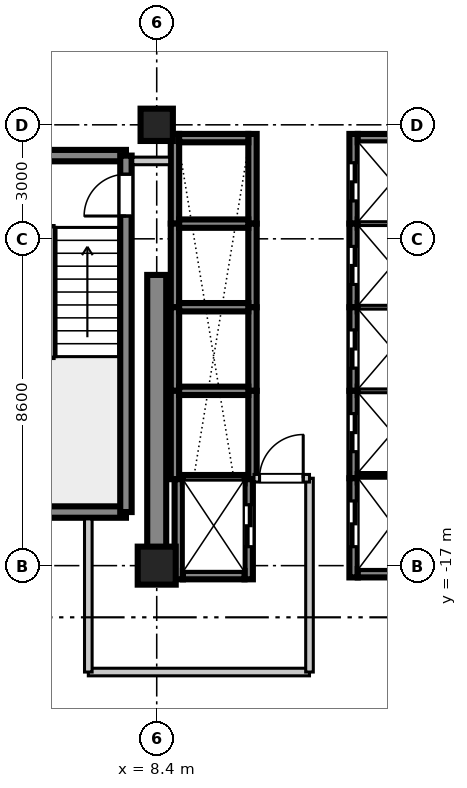
"""IFC4 building model, lengths in metres.
Left out: names, types, materials, properties, quantities, classifications, styles, units other than length and angle.
Written with IfcOpenShell. Run it as: python <this file> out.ifc"""

import sys

from ifc_helpers import new_model, si_unit, direction, frame, frame_2d, origin, origin_2d, place, context, subcontext, project, spatial, rectangle, extrude, source, transform, mapped, element, fill, save


model = new_model("IFC4")
c1 = context("Model", 3, precision=1e-05, world=origin(), true_north=direction((0.0, 1.0)))
c2 = subcontext(c1, "Body", "Model", "MODEL_VIEW")
j1 = project(units=[si_unit("LENGTHUNIT", "METRE"), si_unit("PLANEANGLEUNIT", "RADIAN")], contexts=[c1])
p1 = place(None, origin())
s1 = spatial("IfcSite", under=j1, at=p1, CompositionType="ELEMENT")
p2 = place(p1, origin())
s2 = spatial("IfcBuilding", under=s1, at=p2, CompositionType="ELEMENT")
p3 = place(p2, frame((0.0, 0.0, 241.9)))
s3 = spatial("IfcBuildingStorey", under=s2, at=p3, CompositionType="ELEMENT", Elevation=241.9)
m1 = source(origin(), c2, "Body", "SweptSolid", [
    extrude(rectangle(XDim=1.0, YDim=1.0, at=origin_2d()), origin(), (0.0, 0.0, 1.0), 3.655),
])
p4 = place(p3, frame((8.4, -17.0, 0.0), z_axis=(0.0, 0.0, 1.0), x_axis=(1.0, 0.0, 0.0)))
e1 = element("IfcColumn", 1, at=p4, inside=s3, PredefinedType="COLUMN", context=c2, shape_type="MappedRepresentation", body=[
    mapped(m1, transform((0.0, 0.0, 0.0), scale=1.0)),
])
m2 = source(origin(), c2, "Body", "SweptSolid", [
    extrude(rectangle(XDim=0.85, YDim=0.85, at=origin_2d()), origin(), (0.0, 0.0, 1.0), 3.655),
])
p5 = place(p3, frame((8.4, -5.4, 0.0), z_axis=(0.0, 0.0, 1.0), x_axis=(1.0, 0.0, 0.0)))
e2 = element("IfcColumn", 2, at=p5, inside=s3, PredefinedType="PILASTER", context=c2, shape_type="MappedRepresentation", body=[
    mapped(m2, transform((0.0, 0.0, 0.0), scale=1.0)),
])
m3 = source(origin(), c2, "Body", "SweptSolid", [
    extrude(rectangle(XDim=7.65, YDim=0.5, at=frame_2d((3.825, 0.0))), origin(), (0.0, 0.0, 1.0), 3.41),
])
p6 = place(p3, frame((8.4, -17.0, 0.0), z_axis=(0.0, 0.0, 1.0), x_axis=(0.0, 1.0, 0.0)))
e3 = element("IfcWall", 3, at=p6, inside=s3, PredefinedType="SHEAR", context=c2, shape_type="MappedRepresentation", body=[
    mapped(m3, transform((0.0, 0.0, 0.0), scale=1.0)),
])
m4 = source(origin(), c2, "Body", "SweptSolid", [
    extrude(rectangle(XDim=3.98, YDim=0.3, at=frame_2d((1.99, 0.0))), origin(), (0.0, 0.0, 1.0), 3.41),
])
for number, where, z_axis, x_axis in (
    (4, (3.61, -15.59, 0.0), (0.0, 0.0, 1.0), (1.0, 0.0, 0.0)),
    (5, (3.61, -6.21, 0.0), (0.0, 0.0, 1.0), (1.0, 0.0, 0.0)),
):
    element("IfcWall", number, at=place(p3, frame(where, z_axis=z_axis, x_axis=x_axis)), inside=s3, PredefinedType="SHEAR", context=c2, shape_type="MappedRepresentation", body=[
        mapped(m4, transform((0.0, 0.0, 0.0), scale=1.0)),
    ])
m5 = source(origin(), c2, "Body", "SweptSolid", [
    extrude(rectangle(XDim=9.38, YDim=0.3, at=frame_2d((4.69, 0.0))), origin(), (0.0, 0.0, 1.0), 3.41),
])
p7 = place(p3, frame((7.59, -15.59, 0.0), z_axis=(0.0, 0.0, 1.0), x_axis=(0.0, 1.0, 0.0)))
e6 = element("IfcWall", 6, at=p7, inside=s3, PredefinedType="SHEAR", context=c2, shape_type="MappedRepresentation", body=[
    mapped(m5, transform((0.0, 0.0, 0.0), scale=1.0)),
])
p8 = place(p7, frame((7.79, 0.0, 0.0)))
e7 = element("IfcOpeningElement", 7, at=p8, cuts=e6, PredefinedType="OPENING", context=c2, shape_type="SweptSolid", body=[
    extrude(rectangle(XDim=1.1, YDim=2.15, at=frame_2d((0.55, 1.075))), frame((0.0, 0.16, 0.0), z_axis=(0.0, -1.0, 0.0), x_axis=(1.0, 0.0, 0.0)), (0.0, 0.0, 1.0), 0.32),
])
m6 = source(origin(), c2, "Body", "SweptSolid", [
    extrude(rectangle(XDim=2.36, YDim=0.22, at=frame_2d((1.18, 0.0))), origin(), (0.0, 0.0, 1.0), 3.41),
])
p9 = place(p3, frame((13.58, -8.0, 0.0), z_axis=(0.0, 0.0, 1.0), x_axis=(0.0, 1.0, 0.0)))
e8 = element("IfcWall", 8, at=p9, inside=s3, PredefinedType="SHEAR", context=c2, shape_type="MappedRepresentation", body=[
    mapped(m6, transform((0.0, 0.0, 0.0), scale=1.0)),
])
p10 = place(p9, frame((0.6, 0.0, 0.0)))
e9 = element("IfcOpeningElement", 9, at=p10, cuts=e8, PredefinedType="OPENING", context=c2, shape_type="SweptSolid", body=[
    extrude(rectangle(XDim=1.0, YDim=2.2, at=frame_2d((0.5, 1.1))), frame((0.0, 0.12, 0.0), z_axis=(0.0, -1.0, 0.0), x_axis=(1.0, 0.0, 0.0)), (0.0, 0.0, 1.0), 0.24),
])
m7 = source(origin(), c2, "Body", "SweptSolid", [
    extrude(rectangle(XDim=1.82, YDim=0.22, at=frame_2d((0.91, 0.0))), origin(), (0.0, 0.0, 1.0), 3.41),
])
p11 = place(p3, frame((13.69, -5.75, 0.0), z_axis=(0.0, 0.0, 1.0), x_axis=(1.0, 0.0, 0.0)))
e10 = element("IfcWall", 10, at=p11, inside=s3, PredefinedType="SHEAR", context=c2, shape_type="MappedRepresentation", body=[
    mapped(m7, transform((0.0, 0.0, 0.0), scale=1.0)),
])
m8 = source(origin(), c2, "Body", "SweptSolid", [
    extrude(rectangle(XDim=2.2, YDim=0.22, at=frame_2d((1.1, 0.0))), origin(), (0.0, 0.0, 1.0), 3.41),
])
p12 = place(p3, frame((13.58, -10.2, 0.0), z_axis=(0.0, 0.0, 1.0), x_axis=(0.0, 1.0, 0.0)))
e11 = element("IfcWall", 11, at=p12, inside=s3, PredefinedType="SHEAR", context=c2, shape_type="MappedRepresentation", body=[
    mapped(m8, transform((0.0, 0.0, 0.0), scale=1.0)),
])
p13 = place(p12, frame((0.6, 0.0, 0.0)))
e12 = element("IfcOpeningElement", 12, at=p13, cuts=e11, PredefinedType="OPENING", context=c2, shape_type="SweptSolid", body=[
    extrude(rectangle(XDim=1.0, YDim=2.2, at=frame_2d((0.5, 1.1))), frame((0.0, 0.12, 0.0), z_axis=(0.0, -1.0, 0.0), x_axis=(1.0, 0.0, 0.0)), (0.0, 0.0, 1.0), 0.24),
])
m9 = source(origin(), c2, "Body", "SweptSolid", [
    extrude(rectangle(XDim=1.82, YDim=0.22, at=frame_2d((0.91, 0.0))), origin(), (0.0, 0.0, 1.0), 3.7),
])
p14 = place(p3, frame((13.69, -8.0, 0.0), z_axis=(0.0, 0.0, 1.0), x_axis=(1.0, 0.0, 0.0)))
e13 = element("IfcWall", 13, at=p14, inside=s3, PredefinedType="SHEAR", context=c2, shape_type="MappedRepresentation", body=[
    mapped(m9, transform((0.0, 0.0, 0.0), scale=1.0)),
])
p15 = place(p3, frame((13.58, -12.4, 0.0), z_axis=(0.0, 0.0, 1.0), x_axis=(0.0, 1.0, 0.0)))
e14 = element("IfcWall", 14, at=p15, inside=s3, PredefinedType="SHEAR", context=c2, shape_type="MappedRepresentation", body=[
    mapped(m8, transform((0.0, 0.0, 0.0), scale=1.0)),
])
p16 = place(p15, frame((0.6, 0.0, 0.0)))
e15 = element("IfcOpeningElement", 15, at=p16, cuts=e14, PredefinedType="OPENING", context=c2, shape_type="SweptSolid", body=[
    extrude(rectangle(XDim=1.0, YDim=2.2, at=frame_2d((0.5, 1.1))), frame((0.0, 0.12, 0.0), z_axis=(0.0, -1.0, 0.0), x_axis=(1.0, 0.0, 0.0)), (0.0, 0.0, 1.0), 0.24),
])
p17 = place(p3, frame((13.69, -10.2, 0.0), z_axis=(0.0, 0.0, 1.0), x_axis=(1.0, 0.0, 0.0)))
e16 = element("IfcWall", 16, at=p17, inside=s3, PredefinedType="SHEAR", context=c2, shape_type="MappedRepresentation", body=[
    mapped(m9, transform((0.0, 0.0, 0.0), scale=1.0)),
])
m10 = source(origin(), c2, "Body", "SweptSolid", [
    extrude(rectangle(XDim=2.3, YDim=0.22, at=frame_2d((1.15, 0.0))), origin(), (0.0, 0.0, 1.0), 3.41),
])
p18 = place(p3, frame((13.58, -14.7, 0.0), z_axis=(0.0, 0.0, 1.0), x_axis=(0.0, 1.0, 0.0)))
e17 = element("IfcWall", 17, at=p18, inside=s3, PredefinedType="SHEAR", context=c2, shape_type="MappedRepresentation", body=[
    mapped(m10, transform((0.0, 0.0, 0.0), scale=1.0)),
])
p19 = place(p18, frame((0.7, 0.0, 0.0)))
e18 = element("IfcOpeningElement", 18, at=p19, cuts=e17, PredefinedType="OPENING", context=c2, shape_type="SweptSolid", body=[
    extrude(rectangle(XDim=1.0, YDim=2.2, at=frame_2d((0.5, 1.1))), frame((0.0, 0.12, 0.0), z_axis=(0.0, -1.0, 0.0), x_axis=(1.0, 0.0, 0.0)), (0.0, 0.0, 1.0), 0.24),
])
p20 = place(p3, frame((13.69, -12.4, 0.0), z_axis=(0.0, 0.0, 1.0), x_axis=(1.0, 0.0, 0.0)))
e19 = element("IfcWall", 19, at=p20, inside=s3, PredefinedType="SHEAR", context=c2, shape_type="MappedRepresentation", body=[
    mapped(m9, transform((0.0, 0.0, 0.0), scale=1.0)),
])
for number, where, z_axis, x_axis in (
    (20, (8.88, -8.0, 0.0), (0.0, 0.0, 1.0), (0.0, 1.0, 0.0)),
    (21, (10.92, -8.0, 0.0), (0.0, 0.0, 1.0), (0.0, 1.0, 0.0)),
):
    element("IfcWall", number, at=place(p3, frame(where, z_axis=z_axis, x_axis=x_axis)), inside=s3, PredefinedType="SHEAR", context=c2, shape_type="MappedRepresentation", body=[
        mapped(m6, transform((0.0, 0.0, 0.0), scale=1.0)),
    ])
p21 = place(p3, frame((8.99, -5.75, 0.0), z_axis=(0.0, 0.0, 1.0), x_axis=(1.0, 0.0, 0.0)))
e22 = element("IfcWall", 22, at=p21, inside=s3, PredefinedType="SHEAR", context=c2, shape_type="MappedRepresentation", body=[
    mapped(m7, transform((0.0, 0.0, 0.0), scale=1.0)),
])
for number, where, z_axis, x_axis in (
    (23, (8.88, -10.2, 0.0), (0.0, 0.0, 1.0), (0.0, 1.0, 0.0)),
    (24, (10.92, -10.2, 0.0), (0.0, 0.0, 1.0), (0.0, 1.0, 0.0)),
):
    element("IfcWall", number, at=place(p3, frame(where, z_axis=z_axis, x_axis=x_axis)), inside=s3, PredefinedType="SHEAR", context=c2, shape_type="MappedRepresentation", body=[
        mapped(m8, transform((0.0, 0.0, 0.0), scale=1.0)),
    ])
p22 = place(p3, frame((8.99, -8.0, 0.0), z_axis=(0.0, 0.0, 1.0), x_axis=(1.0, 0.0, 0.0)))
e25 = element("IfcWall", 25, at=p22, inside=s3, PredefinedType="SHEAR", context=c2, shape_type="MappedRepresentation", body=[
    mapped(m9, transform((0.0, 0.0, 0.0), scale=1.0)),
])
for number, where, z_axis, x_axis in (
    (26, (8.88, -12.4, 0.0), (0.0, 0.0, 1.0), (0.0, 1.0, 0.0)),
    (27, (10.92, -12.4, 0.0), (0.0, 0.0, 1.0), (0.0, 1.0, 0.0)),
):
    element("IfcWall", number, at=place(p3, frame(where, z_axis=z_axis, x_axis=x_axis)), inside=s3, PredefinedType="SHEAR", context=c2, shape_type="MappedRepresentation", body=[
        mapped(m8, transform((0.0, 0.0, 0.0), scale=1.0)),
    ])
p23 = place(p3, frame((8.99, -10.2, 0.0), z_axis=(0.0, 0.0, 1.0), x_axis=(1.0, 0.0, 0.0)))
e28 = element("IfcWall", 28, at=p23, inside=s3, PredefinedType="SHEAR", context=c2, shape_type="MappedRepresentation", body=[
    mapped(m9, transform((0.0, 0.0, 0.0), scale=1.0)),
])
m11 = source(origin(), c2, "Body", "SweptSolid", [
    extrude(rectangle(XDim=2.325, YDim=0.22, at=frame_2d((1.163, 0.0))), origin(), (0.0, 0.0, 1.0), 3.41),
])
for number, where, z_axis, x_axis in (
    (29, (8.88, -14.725, 0.0), (0.0, 0.0, 1.0), (0.0, 1.0, 0.0)),
    (30, (10.92, -14.725, 0.0), (0.0, 0.0, 1.0), (0.0, 1.0, 0.0)),
):
    element("IfcWall", number, at=place(p3, frame(where, z_axis=z_axis, x_axis=x_axis)), inside=s3, PredefinedType="SHEAR", context=c2, shape_type="MappedRepresentation", body=[
        mapped(m11, transform((0.0, 0.0, 0.0), scale=1.0)),
    ])
p24 = place(p3, frame((8.99, -12.4, 0.0), z_axis=(0.0, 0.0, 1.0), x_axis=(1.0, 0.0, 0.0)))
e31 = element("IfcWall", 31, at=p24, inside=s3, PredefinedType="SHEAR", context=c2, shape_type="MappedRepresentation", body=[
    mapped(m9, transform((0.0, 0.0, 0.0), scale=1.0)),
])
m12 = source(origin(), c2, "Body", "SweptSolid", [
    extrude(rectangle(XDim=2.635, YDim=0.22, at=frame_2d((1.317, 0.0))), origin(), (0.0, 0.0, 1.0), 3.41),
])
p25 = place(p3, frame((8.98, -17.36, 0.0), z_axis=(0.0, 0.0, 1.0), x_axis=(0.0, 1.0, 0.0)))
e32 = element("IfcWall", 32, at=p25, inside=s3, PredefinedType="SHEAR", context=c2, shape_type="MappedRepresentation", body=[
    mapped(m12, transform((0.0, 0.0, 0.0), scale=1.0)),
])
p26 = place(p3, frame((10.82, -17.36, 0.0), z_axis=(0.0, 0.0, 1.0), x_axis=(0.0, 1.0, 0.0)))
e33 = element("IfcWall", 33, at=p26, inside=s3, PredefinedType="SHEAR", context=c2, shape_type="MappedRepresentation", body=[
    mapped(m12, transform((0.0, 0.0, 0.0), scale=1.0)),
])
p27 = place(p26, frame((0.86, 0.0, 0.0)))
e34 = element("IfcOpeningElement", 34, at=p27, cuts=e33, PredefinedType="OPENING", context=c2, shape_type="SweptSolid", body=[
    extrude(rectangle(XDim=1.1, YDim=2.2, at=frame_2d((0.55, 1.1))), frame((0.0, 0.12, 0.0), z_axis=(0.0, -1.0, 0.0), x_axis=(1.0, 0.0, 0.0)), (0.0, 0.0, 1.0), 0.24),
])
m13 = source(origin(), c2, "Body", "SweptSolid", [
    extrude(rectangle(XDim=1.62, YDim=0.22, at=frame_2d((0.81, 0.0))), origin(), (0.0, 0.0, 1.0), 3.41),
])
p28 = place(p3, frame((9.09, -17.25, 0.0), z_axis=(0.0, 0.0, 1.0), x_axis=(1.0, 0.0, 0.0)))
e35 = element("IfcWall", 35, at=p28, inside=s3, PredefinedType="SHEAR", context=c2, shape_type="MappedRepresentation", body=[
    mapped(m13, transform((0.0, 0.0, 0.0), scale=1.0)),
])
m14 = source(origin(), c2, "Body", "SweptSolid", [
    extrude(rectangle(XDim=1.62, YDim=0.22, at=frame_2d((0.81, 0.0))), origin(), (0.0, 0.0, 1.0), 3.7),
])
p29 = place(p3, frame((9.09, -14.725, 0.0), z_axis=(0.0, 0.0, 1.0), x_axis=(1.0, 0.0, 0.0)))
e36 = element("IfcWall", 36, at=p29, inside=s3, PredefinedType="SHEAR", context=c2, shape_type="MappedRepresentation", body=[
    mapped(m14, transform((0.0, 0.0, 0.0), scale=1.0)),
])
m15 = source(origin(), c2, "Body", "SweptSolid", [
    extrude(rectangle(XDim=2.61, YDim=0.22, at=frame_2d((1.305, 0.0))), origin(), (0.0, 0.0, 1.0), 3.41),
])
p30 = place(p3, frame((13.58, -17.31, 0.0), z_axis=(0.0, 0.0, 1.0), x_axis=(0.0, 1.0, 0.0)))
e37 = element("IfcWall", 37, at=p30, inside=s3, PredefinedType="SHEAR", context=c2, shape_type="MappedRepresentation", body=[
    mapped(m15, transform((0.0, 0.0, 0.0), scale=1.0)),
])
p31 = place(p30, frame((0.81, 0.0, 0.0)))
e38 = element("IfcOpeningElement", 38, at=p31, cuts=e37, PredefinedType="OPENING", context=c2, shape_type="SweptSolid", body=[
    extrude(rectangle(XDim=1.2, YDim=2.2, at=frame_2d((0.6, 1.1))), frame((0.0, 0.12, 0.0), z_axis=(0.0, -1.0, 0.0), x_axis=(1.0, 0.0, 0.0)), (0.0, 0.0, 1.0), 0.24),
])
p32 = place(p3, frame((13.69, -17.2, 0.0), z_axis=(0.0, 0.0, 1.0), x_axis=(1.0, 0.0, 0.0)))
e39 = element("IfcWall", 39, at=p32, inside=s3, PredefinedType="SHEAR", context=c2, shape_type="MappedRepresentation", body=[
    mapped(m7, transform((0.0, 0.0, 0.0), scale=1.0)),
])
p33 = place(p3, frame((13.69, -14.7, 0.0), z_axis=(0.0, 0.0, 1.0), x_axis=(1.0, 0.0, 0.0)))
e40 = element("IfcWall", 40, at=p33, inside=s3, PredefinedType="SHEAR", context=c2, shape_type="MappedRepresentation", body=[
    mapped(m9, transform((0.0, 0.0, 0.0), scale=1.0)),
])
m16 = source(origin(), c2, "Body", "SweptSolid", [
    extrude(rectangle(XDim=5.82, YDim=0.2, at=frame_2d((2.91, 0.0))), origin(), (0.0, 0.0, 1.0), 2.75),
])
p34 = place(p3, frame((6.6, -19.8, 0.0), z_axis=(0.0, 0.0, 1.0), x_axis=(1.0, 0.0, 0.0)))
e41 = element("IfcWall", 41, at=p34, inside=s3, PredefinedType="PARTITIONING", context=c2, shape_type="MappedRepresentation", body=[
    mapped(m16, transform((0.0, 0.0, 0.0), scale=1.0)),
])
m17 = source(origin(), c2, "Body", "SweptSolid", [
    extrude(rectangle(XDim=4.03, YDim=0.2, at=frame_2d((2.015, 0.0))), origin(), (0.0, 0.0, 1.0), 2.75),
])
p35 = place(p3, frame((6.6, -19.8, 0.0), z_axis=(0.0, 0.0, 1.0), x_axis=(0.0, 1.0, 0.0)))
e42 = element("IfcWall", 42, at=p35, inside=s3, PredefinedType="PARTITIONING", context=c2, shape_type="MappedRepresentation", body=[
    mapped(m17, transform((0.0, 0.0, 0.0), scale=1.0)),
])
m18 = source(origin(), c2, "Body", "SweptSolid", [
    extrude(rectangle(XDim=5.1, YDim=0.2, at=frame_2d((2.55, 0.0))), origin(), (0.0, 0.0, 1.0), 2.75),
])
p36 = place(p3, frame((12.42, -19.8, 0.0), z_axis=(0.0, 0.0, 1.0), x_axis=(0.0, 1.0, 0.0)))
e43 = element("IfcWall", 43, at=p36, inside=s3, PredefinedType="PARTITIONING", context=c2, shape_type="MappedRepresentation", body=[
    mapped(m18, transform((0.0, 0.0, 0.0), scale=1.0)),
])
m19 = source(origin(), c2, "Body", "SweptSolid", [
    extrude(rectangle(XDim=1.46, YDim=0.2, at=frame_2d((0.73, 0.0))), origin(), (0.0, 0.0, 1.0), 2.75),
])
p37 = place(p3, frame((10.96, -14.7, 0.0), z_axis=(0.0, 0.0, 1.0), x_axis=(1.0, 0.0, 0.0)))
e44 = element("IfcWall", 44, at=p37, inside=s3, PredefinedType="PARTITIONING", context=c2, shape_type="MappedRepresentation", body=[
    mapped(m19, transform((0.0, 0.0, 0.0), scale=1.0)),
])
p38 = place(p37, frame((0.145, 0.0, 0.0)))
e45 = element("IfcOpeningElement", 45, at=p38, cuts=e44, PredefinedType="OPENING", context=c2, shape_type="SweptSolid", body=[
    extrude(rectangle(XDim=1.15, YDim=2.15, at=frame_2d((0.575, 1.075))), frame((0.0, 0.11, 0.0), z_axis=(0.0, -1.0, 0.0), x_axis=(1.0, 0.0, 0.0)), (0.0, 0.0, 1.0), 0.22),
])
m20 = source(origin(), c2, "Body", "SweptSolid", [
    extrude(rectangle(XDim=0.97, YDim=0.2, at=frame_2d((0.485, 0.0))), origin(), (0.0, 0.0, 1.0), 2.75),
])
p39 = place(p3, frame((7.77, -6.35, 0.0), z_axis=(0.0, 0.0, 1.0), x_axis=(1.0, 0.0, 0.0)))
e46 = element("IfcWall", 46, at=p39, inside=s3, PredefinedType="PARTITIONING", context=c2, shape_type="MappedRepresentation", body=[
    mapped(m20, transform((0.0, 0.0, 0.0), scale=1.0)),
])
m21 = source(origin(), c2, "Body", "SweptSolid", [
    extrude(rectangle(XDim=1.1, YDim=2.15, at=frame_2d((0.55, 1.075))), frame((0.0, 0.025, 0.0), z_axis=(0.0, -1.0, 0.0), x_axis=(1.0, 0.0, 0.0)), (0.0, 0.0, 1.0), 0.05),
])
p40 = place(p8, origin())
e47 = element("IfcDoor", 47, at=p40, inside=s3, OperationType="SINGLE_SWING_LEFT", PredefinedType="DOOR", context=c2, shape_type="MappedRepresentation", body=[
    mapped(m21, transform((0.0, 0.0, 0.0), scale=1.0)),
])
fill(e7, e47)
m22 = source(origin(), c2, "Body", "SweptSolid", [
    extrude(rectangle(XDim=1.0, YDim=2.2, at=frame_2d((0.5, 1.1))), frame((0.0, 0.025, 0.0), z_axis=(0.0, -1.0, 0.0), x_axis=(1.0, 0.0, 0.0)), (0.0, 0.0, 1.0), 0.05),
])
p41 = place(p10, origin())
e48 = element("IfcDoor", 48, at=p41, inside=s3, OperationType="DOUBLE_DOOR_SLIDING", PredefinedType="DOOR", context=c2, shape_type="MappedRepresentation", body=[
    mapped(m22, transform((0.0, 0.0, 0.0), scale=1.0)),
])
fill(e9, e48)
p42 = place(p13, origin())
e49 = element("IfcDoor", 49, at=p42, inside=s3, OperationType="DOUBLE_DOOR_SLIDING", PredefinedType="DOOR", context=c2, shape_type="MappedRepresentation", body=[
    mapped(m22, transform((0.0, 0.0, 0.0), scale=1.0)),
])
fill(e12, e49)
p43 = place(p16, origin())
e50 = element("IfcDoor", 50, at=p43, inside=s3, OperationType="DOUBLE_DOOR_SLIDING", PredefinedType="DOOR", context=c2, shape_type="MappedRepresentation", body=[
    mapped(m22, transform((0.0, 0.0, 0.0), scale=1.0)),
])
fill(e15, e50)
p44 = place(p19, origin())
e51 = element("IfcDoor", 51, at=p44, inside=s3, OperationType="DOUBLE_DOOR_SLIDING", PredefinedType="DOOR", context=c2, shape_type="MappedRepresentation", body=[
    mapped(m22, transform((0.0, 0.0, 0.0), scale=1.0)),
])
fill(e18, e51)
m23 = source(origin(), c2, "Body", "SweptSolid", [
    extrude(rectangle(XDim=1.1, YDim=2.2, at=frame_2d((0.55, 1.1))), frame((0.0, 0.025, 0.0), z_axis=(0.0, -1.0, 0.0), x_axis=(1.0, 0.0, 0.0)), (0.0, 0.0, 1.0), 0.05),
])
p45 = place(p27, frame((1.1, 0.0, 0.0), z_axis=(0.0, 0.0, 1.0), x_axis=(-1.0, 0.0, 0.0)))
e52 = element("IfcDoor", 52, at=p45, inside=s3, OperationType="DOUBLE_DOOR_SLIDING", PredefinedType="DOOR", context=c2, shape_type="MappedRepresentation", body=[
    mapped(m23, transform((0.0, 0.0, 0.0), scale=1.0)),
])
fill(e34, e52)
m24 = source(origin(), c2, "Body", "SweptSolid", [
    extrude(rectangle(XDim=1.2, YDim=2.2, at=frame_2d((0.6, 1.1))), frame((0.0, 0.025, 0.0), z_axis=(0.0, -1.0, 0.0), x_axis=(1.0, 0.0, 0.0)), (0.0, 0.0, 1.0), 0.05),
])
p46 = place(p31, origin())
e53 = element("IfcDoor", 53, at=p46, inside=s3, OperationType="DOUBLE_DOOR_SLIDING", PredefinedType="DOOR", context=c2, shape_type="MappedRepresentation", body=[
    mapped(m24, transform((0.0, 0.0, 0.0), scale=1.0)),
])
fill(e38, e53)
m25 = source(origin(), c2, "Body", "SweptSolid", [
    extrude(rectangle(XDim=1.15, YDim=2.15, at=frame_2d((0.575, 1.075))), frame((0.0, 0.025, 0.0), z_axis=(0.0, -1.0, 0.0), x_axis=(1.0, 0.0, 0.0)), (0.0, 0.0, 1.0), 0.05),
])
p47 = place(p38, origin())
e54 = element("IfcDoor", 54, at=p47, inside=s3, OperationType="SINGLE_SWING_RIGHT", PredefinedType="DOOR", context=c2, shape_type="MappedRepresentation", body=[
    mapped(m25, transform((0.0, 0.0, 0.0), scale=1.0)),
])
fill(e45, e54)
save(model, sys.argv[1])
